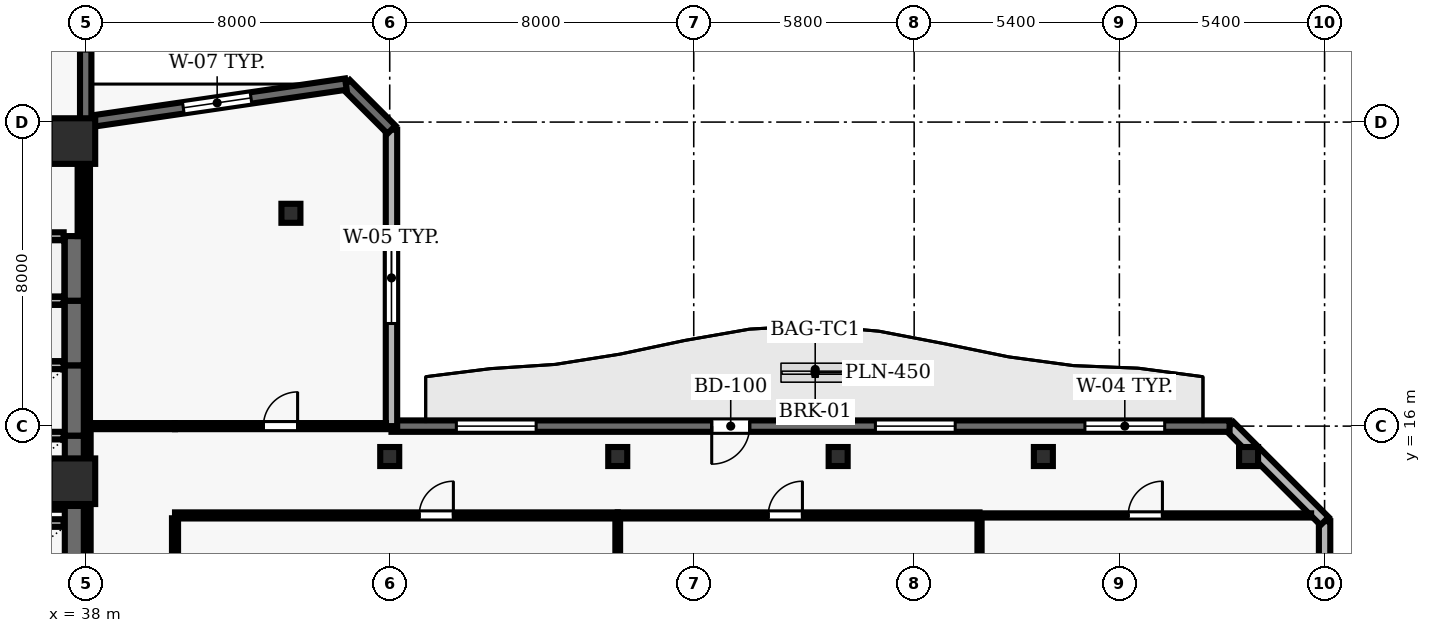
"""IFC4 building model, lengths in metres.
Left out: names, types, materials, properties, quantities, classifications, styles, units other than length and angle.
Written with IfcOpenShell. Run it as: python <this file> out.ifc"""

import sys

from ifc_helpers import new_model, si_unit, direction, frame, frame_2d, origin, origin_2d, place, context, subcontext, project, spatial, rectangle, hollow_rectangle, extrude, element, fill, save


model = new_model("IFC4")
c1 = context("Model", 3, precision=1e-05, world=origin(), true_north=direction((0.0, 1.0)))
c2 = subcontext(c1, "Body", "Model", "MODEL_VIEW")
j1 = project(units=[si_unit("LENGTHUNIT", "METRE"), si_unit("PLANEANGLEUNIT", "RADIAN")], contexts=[c1])
p1 = place(None, origin())
s1 = spatial("IfcSite", under=j1, at=p1, CompositionType="ELEMENT")
p2 = place(p1, origin())
s2 = spatial("IfcBuilding", under=s1, at=p2, CompositionType="ELEMENT")
p3 = place(p2, frame((0.0, 0.0, 146.3)))
s3 = spatial("IfcBuildingStorey", under=s2, at=p3, CompositionType="ELEMENT", Elevation=146.3)
for number, where, z_axis, x_axis in (
    (1, (37.65, 14.55, 0.0), (0.0, 0.0, 1.0), (1.0, 0.0, 0.0)),
    (2, (37.65, 23.5, 0.0), (0.0, 0.0, 1.0), (1.0, 0.0, 0.0)),
):
    element("IfcColumn", number, at=place(p3, frame(where, z_axis=z_axis, x_axis=x_axis)), inside=s3, PredefinedType="COLUMN", context=c2, shape_type="SweptSolid", body=[
        extrude(rectangle(XDim=1.2, YDim=1.2, at=origin_2d()), origin(), (0.0, 0.0, 1.0), 3.9),
    ])
for number, where, z_axis, x_axis in (
    (3, (46.0, 15.2, 0.0), (0.0, 0.0, 1.0), (1.0, 0.0, 0.0)),
    (4, (52.0, 15.2, 0.0), (0.0, 0.0, 1.0), (1.0, 0.0, 0.0)),
    (5, (57.8, 15.2, 0.0), (0.0, 0.0, 1.0), (1.0, 0.0, 0.0)),
    (6, (63.2, 15.2, 0.0), (0.0, 0.0, 1.0), (1.0, 0.0, 0.0)),
    (7, (68.6, 15.2, 0.0), (0.0, 0.0, 1.0), (1.0, 0.0, 0.0)),
    (8, (43.4, 21.6, 0.0), (0.0, 0.0, 1.0), (1.0, 0.0, 0.0)),
):
    element("IfcColumn", number, at=place(p3, frame(where, z_axis=z_axis, x_axis=x_axis)), inside=s3, PredefinedType="COLUMN", context=c2, shape_type="SweptSolid", body=[
        extrude(hollow_rectangle(XDim=0.5, YDim=0.5, WallThickness=0.025, at=origin_2d()), origin(), (0.0, 0.0, 1.0), 3.9),
    ])
p4 = place(p3, frame((70.6, 2.5, 0.0), z_axis=(0.0, 0.0, 1.0), x_axis=(0.0, 1.0, 0.0)))
e9 = element("IfcWall", 9, at=p4, inside=s3, PredefinedType="SOLIDWALL", context=c2, shape_type="SweptSolid", body=[
    extrude(rectangle(XDim=11.0, YDim=0.3, at=frame_2d((5.5, 0.0))), origin(), (0.0, 0.0, 1.0), 3.69),
])
p5 = place(p4, frame((2.0, 0.0, 0.9)))
e10 = element("IfcOpeningElement", 10, at=p5, cuts=e9, PredefinedType="OPENING", context=c2, shape_type="SweptSolid", body=[
    extrude(rectangle(XDim=1.5, YDim=1.6, at=frame_2d((0.75, 0.8))), frame((0.0, 0.16, 0.0), z_axis=(0.0, -1.0, 0.0), x_axis=(1.0, 0.0, 0.0)), (0.0, 0.0, 1.0), 0.32),
])
p6 = place(p4, frame((7.5, 0.0, 0.9)))
e11 = element("IfcOpeningElement", 11, at=p6, cuts=e9, PredefinedType="OPENING", context=c2, shape_type="SweptSolid", body=[
    extrude(rectangle(XDim=1.5, YDim=1.6, at=frame_2d((0.75, 0.8))), frame((0.0, 0.16, 0.0), z_axis=(0.0, -1.0, 0.0), x_axis=(1.0, 0.0, 0.0)), (0.0, 0.0, 1.0), 0.32),
])
p7 = place(p3, frame((70.6, 13.5, 0.0), z_axis=(0.0, 0.0, 1.0), x_axis=(-0.707106781187, 0.707106781187, 0.0)))
e12 = element("IfcWall", 12, at=p7, inside=s3, PredefinedType="SOLIDWALL", context=c2, shape_type="SweptSolid", body=[
    extrude(rectangle(XDim=3.536, YDim=0.3, at=frame_2d((1.768, 0.0))), origin(), (0.0, 0.0, 1.0), 3.69),
])
p8 = place(p3, frame((68.1, 16.0, 0.0), z_axis=(0.0, 0.0, 1.0), x_axis=(-1.0, 0.0, 0.0)))
e13 = element("IfcWall", 13, at=p8, inside=s3, PredefinedType="SOLIDWALL", context=c2, shape_type="SweptSolid", body=[
    extrude(rectangle(XDim=22.054, YDim=0.3, at=frame_2d((11.027, 0.0))), origin(), (0.0, 0.0, 1.0), 3.69),
])
p9 = place(p8, frame((12.627, 0.0, 0.0)))
e14 = element("IfcOpeningElement", 14, at=p9, cuts=e13, PredefinedType="OPENING", context=c2, shape_type="SweptSolid", body=[
    extrude(rectangle(XDim=1.0, YDim=2.2, at=frame_2d((0.5, 1.1))), frame((0.0, 0.16, 0.0), z_axis=(0.0, -1.0, 0.0), x_axis=(1.0, 0.0, 0.0)), (0.0, 0.0, 1.0), 0.32),
])
p10 = place(p8, frame((1.707, 0.0, 0.9)))
e15 = element("IfcOpeningElement", 15, at=p10, cuts=e13, PredefinedType="OPENING", context=c2, shape_type="SweptSolid", body=[
    extrude(rectangle(XDim=2.1, YDim=1.6, at=frame_2d((1.05, 0.8))), frame((0.0, 0.16, 0.0), z_axis=(0.0, -1.0, 0.0), x_axis=(1.0, 0.0, 0.0)), (0.0, 0.0, 1.0), 0.32),
])
p11 = place(p8, frame((7.22, 0.0, 0.9)))
e16 = element("IfcOpeningElement", 16, at=p11, cuts=e13, PredefinedType="OPENING", context=c2, shape_type="SweptSolid", body=[
    extrude(rectangle(XDim=2.1, YDim=1.6, at=frame_2d((1.05, 0.8))), frame((0.0, 0.16, 0.0), z_axis=(0.0, -1.0, 0.0), x_axis=(1.0, 0.0, 0.0)), (0.0, 0.0, 1.0), 0.32),
])
p12 = place(p8, frame((18.247, 0.0, 0.9)))
e17 = element("IfcOpeningElement", 17, at=p12, cuts=e13, PredefinedType="OPENING", context=c2, shape_type="SweptSolid", body=[
    extrude(rectangle(XDim=2.1, YDim=1.6, at=frame_2d((1.05, 0.8))), frame((0.0, 0.16, 0.0), z_axis=(0.0, -1.0, 0.0), x_axis=(1.0, 0.0, 0.0)), (0.0, 0.0, 1.0), 0.32),
])
p13 = place(p3, frame((46.046, 16.0, 0.0), z_axis=(0.0, 0.0, 1.0), x_axis=(0.0, 1.0, 0.0)))
e18 = element("IfcWall", 18, at=p13, inside=s3, PredefinedType="SOLIDWALL", context=c2, shape_type="SweptSolid", body=[
    extrude(rectangle(XDim=7.8, YDim=0.3, at=frame_2d((3.9, 0.0))), origin(), (0.0, 0.0, 1.0), 3.69),
])
p14 = place(p13, frame((2.7, 0.0, 0.9)))
e19 = element("IfcOpeningElement", 19, at=p14, cuts=e18, PredefinedType="OPENING", context=c2, shape_type="SweptSolid", body=[
    extrude(rectangle(XDim=2.4, YDim=1.6, at=frame_2d((1.2, 0.8))), frame((0.0, 0.16, 0.0), z_axis=(0.0, -1.0, 0.0), x_axis=(1.0, 0.0, 0.0)), (0.0, 0.0, 1.0), 0.32),
])
p15 = place(p3, frame((46.046, 23.8, 0.0), z_axis=(0.0, 0.0, 1.0), x_axis=(-0.707106781187, 0.707106781187, 0.0)))
e20 = element("IfcWall", 20, at=p15, inside=s3, PredefinedType="SOLIDWALL", context=c2, shape_type="SweptSolid", body=[
    extrude(rectangle(XDim=1.697, YDim=0.3, at=frame_2d((0.849, 0.0))), origin(), (0.0, 0.0, 1.0), 3.69),
])
p16 = place(p3, frame((44.846, 25.0, 0.0), z_axis=(0.0, 0.0, 1.0), x_axis=(-0.989499256162, -0.144537960602, 0.0)))
e21 = element("IfcWall", 21, at=p16, inside=s3, PredefinedType="SOLIDWALL", context=c2, shape_type="SweptSolid", body=[
    extrude(rectangle(XDim=6.919, YDim=0.3, at=frame_2d((3.459, 0.0))), origin(), (0.0, 0.0, 1.0), 3.69),
])
p17 = place(p16, frame((2.523, 0.0, 0.9)))
e22 = element("IfcOpeningElement", 22, at=p17, cuts=e21, PredefinedType="OPENING", context=c2, shape_type="SweptSolid", body=[
    extrude(rectangle(XDim=1.8, YDim=1.8, at=frame_2d((0.9, 0.9))), frame((0.0, 0.16, 0.0), z_axis=(0.0, -1.0, 0.0), x_axis=(1.0, 0.0, 0.0)), (0.0, 0.0, 1.0), 0.32),
])
p18 = place(p3, frame((38.0, 24.0, 0.0), z_axis=(0.0, 0.0, 1.0), x_axis=(0.0, 1.0, 0.0)))
e23 = element("IfcWall", 23, at=p18, inside=s3, PredefinedType="SOLIDWALL", context=c2, shape_type="SweptSolid", body=[
    extrude(rectangle(XDim=22.1, YDim=0.3, at=frame_2d((11.05, 0.0))), origin(), (0.0, 0.0, 1.0), 3.69),
])
p19 = place(p18, frame((12.35, 0.0, 0.0)))
e24 = element("IfcOpeningElement", 24, at=p19, cuts=e23, PredefinedType="OPENING", context=c2, shape_type="SweptSolid", body=[
    extrude(rectangle(XDim=1.0, YDim=2.2, at=frame_2d((0.5, 1.1))), frame((0.0, 0.16, 0.0), z_axis=(0.0, -1.0, 0.0), x_axis=(1.0, 0.0, 0.0)), (0.0, 0.0, 1.0), 0.32),
])
p20 = place(p18, frame((1.867, 0.0, 0.9)))
e25 = element("IfcOpeningElement", 25, at=p20, cuts=e23, PredefinedType="OPENING", context=c2, shape_type="SweptSolid", body=[
    extrude(rectangle(XDim=2.4, YDim=1.8, at=frame_2d((1.2, 0.9))), frame((0.0, 0.16, 0.0), z_axis=(0.0, -1.0, 0.0), x_axis=(1.0, 0.0, 0.0)), (0.0, 0.0, 1.0), 0.32),
])
p21 = place(p18, frame((16.833, 0.0, 0.9)))
e26 = element("IfcOpeningElement", 26, at=p21, cuts=e23, PredefinedType="OPENING", context=c2, shape_type="SweptSolid", body=[
    extrude(rectangle(XDim=2.4, YDim=1.8, at=frame_2d((1.2, 0.9))), frame((0.0, 0.16, 0.0), z_axis=(0.0, -1.0, 0.0), x_axis=(1.0, 0.0, 0.0)), (0.0, 0.0, 1.0), 0.32),
])
p22 = place(p3, frame((37.7, 11.55, 0.0), z_axis=(0.0, 0.0, 1.0), x_axis=(0.0, 1.0, 0.0)))
e27 = element("IfcWall", 27, at=p22, inside=s3, PredefinedType="SHEAR", context=c2, shape_type="SweptSolid", body=[
    extrude(rectangle(XDim=2.35, YDim=0.5, at=frame_2d((1.175, 0.0))), origin(), (0.0, 0.0, 1.0), 3.69),
])
p23 = place(p3, frame((37.42, 13.45, 0.0), z_axis=(0.0, 0.0, 1.0), x_axis=(-1.0, 0.0, 0.0)))
e28 = element("IfcWall", 28, at=p23, inside=s3, PredefinedType="SOLIDWALL", context=c2, shape_type="SweptSolid", body=[
    extrude(rectangle(XDim=2.14, YDim=0.2, at=frame_2d((1.07, 0.0))), origin(), (0.0, 0.0, 1.0), 3.69),
])
p24 = place(p3, frame((37.7, 13.9, 0.0), z_axis=(0.0, 0.0, 1.0), x_axis=(0.0, 1.0, 0.0)))
e29 = element("IfcWall", 29, at=p24, inside=s3, PredefinedType="SHEAR", context=c2, shape_type="SweptSolid", body=[
    extrude(rectangle(XDim=1.85, YDim=0.5, at=frame_2d((0.925, 0.0))), origin(), (0.0, 0.0, 1.0), 3.69),
])
for number, where, z_axis, x_axis in (
    (30, (35.28, 13.9, 0.0), (0.0, 0.0, 1.0), (1.0, 0.0, 0.0)),
    (31, (37.42, 15.75, 0.0), (0.0, 0.0, 1.0), (-1.0, 0.0, 0.0)),
):
    element("IfcWall", number, at=place(p3, frame(where, z_axis=z_axis, x_axis=x_axis)), inside=s3, PredefinedType="SOLIDWALL", context=c2, shape_type="SweptSolid", body=[
        extrude(rectangle(XDim=2.14, YDim=0.2, at=frame_2d((1.07, 0.0))), origin(), (0.0, 0.0, 1.0), 3.69),
    ])
p25 = place(p3, frame((37.7, 15.75, 0.0), z_axis=(0.0, 0.0, 1.0), x_axis=(0.0, 1.0, 0.0)))
e32 = element("IfcWall", 32, at=p25, inside=s3, PredefinedType="SHEAR", context=c2, shape_type="SweptSolid", body=[
    extrude(rectangle(XDim=1.85, YDim=0.5, at=frame_2d((0.925, 0.0))), origin(), (0.0, 0.0, 1.0), 3.69),
])
p26 = place(p3, frame((37.42, 17.6, 0.0), z_axis=(0.0, 0.0, 1.0), x_axis=(-1.0, 0.0, 0.0)))
e33 = element("IfcWall", 33, at=p26, inside=s3, PredefinedType="SOLIDWALL", context=c2, shape_type="SweptSolid", body=[
    extrude(rectangle(XDim=2.14, YDim=0.2, at=frame_2d((1.07, 0.0))), origin(), (0.0, 0.0, 1.0), 3.69),
])
p27 = place(p3, frame((37.7, 17.6, 0.0), z_axis=(0.0, 0.0, 1.0), x_axis=(0.0, 1.0, 0.0)))
e34 = element("IfcWall", 34, at=p27, inside=s3, PredefinedType="SHEAR", context=c2, shape_type="SweptSolid", body=[
    extrude(rectangle(XDim=1.7, YDim=0.5, at=frame_2d((0.85, 0.0))), origin(), (0.0, 0.0, 1.0), 3.69),
])
p28 = place(p3, frame((37.42, 19.3, 0.0), z_axis=(0.0, 0.0, 1.0), x_axis=(-1.0, 0.0, 0.0)))
e35 = element("IfcWall", 35, at=p28, inside=s3, PredefinedType="SOLIDWALL", context=c2, shape_type="SweptSolid", body=[
    extrude(rectangle(XDim=2.14, YDim=0.2, at=frame_2d((1.07, 0.0))), origin(), (0.0, 0.0, 1.0), 3.69),
])
p29 = place(p3, frame((37.7, 19.3, 0.0), z_axis=(0.0, 0.0, 1.0), x_axis=(0.0, 1.0, 0.0)))
e36 = element("IfcWall", 36, at=p29, inside=s3, PredefinedType="SHEAR", context=c2, shape_type="SweptSolid", body=[
    extrude(rectangle(XDim=1.7, YDim=0.5, at=frame_2d((0.85, 0.0))), origin(), (0.0, 0.0, 1.0), 3.69),
])
p30 = place(p3, frame((37.42, 21.0, 0.0), z_axis=(0.0, 0.0, 1.0), x_axis=(-1.0, 0.0, 0.0)))
e37 = element("IfcWall", 37, at=p30, inside=s3, PredefinedType="SOLIDWALL", context=c2, shape_type="SweptSolid", body=[
    extrude(rectangle(XDim=2.14, YDim=0.2, at=frame_2d((1.07, 0.0))), origin(), (0.0, 0.0, 1.0), 3.69),
])
p31 = place(p3, frame((37.85, 23.85, 0.0), z_axis=(0.0, 0.0, 1.0), x_axis=(-1.0, 0.0, 0.0)))
e38 = element("IfcWall", 38, at=p31, inside=s3, PredefinedType="PARTITIONING", context=c2, shape_type="SweptSolid", body=[
    extrude(rectangle(XDim=4.0, YDim=0.16, at=frame_2d((2.0, 0.0))), origin(), (0.0, 0.0, 1.0), 3.073),
])
p32 = place(p31, frame((2.25, 0.0, 0.0)))
e39 = element("IfcOpeningElement", 39, at=p32, cuts=e38, PredefinedType="OPENING", context=c2, shape_type="SweptSolid", body=[
    extrude(rectangle(XDim=0.9, YDim=2.1, at=frame_2d((0.45, 1.05))), frame((0.0, 0.09, 0.0), z_axis=(0.0, -1.0, 0.0), x_axis=(1.0, 0.0, 0.0)), (0.0, 0.0, 1.0), 0.18),
])
p33 = place(p3, frame((40.35, 13.65, 0.0), z_axis=(0.0, 0.0, 1.0), x_axis=(1.0, 0.0, 0.0)))
e40 = element("IfcWall", 40, at=p33, inside=s3, PredefinedType="PARTITIONING", context=c2, shape_type="SweptSolid", body=[
    extrude(rectangle(XDim=11.65, YDim=0.16, at=frame_2d((5.825, 0.0))), origin(), (0.0, 0.0, 1.0), 3.69),
])
p34 = place(p33, frame((6.425, 0.0, 0.0)))
e41 = element("IfcOpeningElement", 41, at=p34, cuts=e40, PredefinedType="OPENING", context=c2, shape_type="SweptSolid", body=[
    extrude(rectangle(XDim=0.9, YDim=2.1, at=frame_2d((0.45, 1.05))), frame((0.0, 0.09, 0.0), z_axis=(0.0, -1.0, 0.0), x_axis=(1.0, 0.0, 0.0)), (0.0, 0.0, 1.0), 0.18),
])
p35 = place(p3, frame((40.35, 16.0, 0.0), z_axis=(0.0, 0.0, 1.0), x_axis=(-1.0, 0.0, 0.0)))
e42 = element("IfcWall", 42, at=p35, inside=s3, PredefinedType="PARTITIONING", context=c2, shape_type="SweptSolid", body=[
    extrude(rectangle(XDim=2.3, YDim=0.16, at=frame_2d((1.15, 0.0))), origin(), (0.0, 0.0, 1.0), 3.69),
])
p36 = place(p3, frame((40.35, 16.0, 0.0), z_axis=(0.0, 0.0, 1.0), x_axis=(1.0, 0.0, 0.0)))
e43 = element("IfcWall", 43, at=p36, inside=s3, PredefinedType="PARTITIONING", context=c2, shape_type="SweptSolid", body=[
    extrude(rectangle(XDim=5.551, YDim=0.16, at=frame_2d((2.775, 0.0))), origin(), (0.0, 0.0, 1.0), 3.69),
])
p37 = place(p36, frame((2.326, 0.0, 0.0)))
e44 = element("IfcOpeningElement", 44, at=p37, cuts=e43, PredefinedType="OPENING", context=c2, shape_type="SweptSolid", body=[
    extrude(rectangle(XDim=0.9, YDim=2.1, at=frame_2d((0.45, 1.05))), frame((0.0, 0.09, 0.0), z_axis=(0.0, -1.0, 0.0), x_axis=(1.0, 0.0, 0.0)), (0.0, 0.0, 1.0), 0.18),
])
p38 = place(p3, frame((52.0, 13.65, 0.0), z_axis=(0.0, 0.0, 1.0), x_axis=(1.0, 0.0, 0.0)))
e45 = element("IfcWall", 45, at=p38, inside=s3, PredefinedType="PARTITIONING", context=c2, shape_type="SweptSolid", body=[
    extrude(rectangle(XDim=9.52, YDim=0.16, at=frame_2d((4.76, 0.0))), origin(), (0.0, 0.0, 1.0), 3.69),
])
p39 = place(p38, frame((3.96, 0.0, 0.0)))
e46 = element("IfcOpeningElement", 46, at=p39, cuts=e45, PredefinedType="OPENING", context=c2, shape_type="SweptSolid", body=[
    extrude(rectangle(XDim=0.9, YDim=2.1, at=frame_2d((0.45, 1.05))), frame((0.0, 0.09, 0.0), z_axis=(0.0, -1.0, 0.0), x_axis=(1.0, 0.0, 0.0)), (0.0, 0.0, 1.0), 0.18),
])
p40 = place(p3, frame((61.52, 13.65, 0.0), z_axis=(0.0, 0.0, 1.0), x_axis=(1.0, 0.0, 0.0)))
e47 = element("IfcWall", 47, at=p40, inside=s3, PredefinedType="MOVABLE", context=c2, shape_type="SweptSolid", body=[
    extrude(rectangle(XDim=8.725, YDim=0.11, at=frame_2d((4.363, 0.0))), origin(), (0.0, 0.0, 1.0), 3.69),
])
p41 = place(p40, frame((3.913, 0.0, 0.0)))
e48 = element("IfcOpeningElement", 48, at=p41, cuts=e47, PredefinedType="OPENING", context=c2, shape_type="SweptSolid", body=[
    extrude(rectangle(XDim=0.9, YDim=2.1, at=frame_2d((0.45, 1.05))), frame((0.0, 0.065, 0.0), z_axis=(0.0, -1.0, 0.0), x_axis=(1.0, 0.0, 0.0)), (0.0, 0.0, 1.0), 0.13),
])
p42 = place(p3, frame((37.85, 21.0, 0.0), z_axis=(0.0, 0.0, 1.0), x_axis=(0.0, 1.0, 0.0)))
e49 = element("IfcWall", 49, at=p42, inside=s3, PredefinedType="PARTITIONING", context=c2, shape_type="SweptSolid", body=[
    extrude(rectangle(XDim=2.775, YDim=0.125, at=frame_2d((1.387, 0.0))), origin(), (0.0, 0.0, 1.0), 3.073),
])
p43 = place(p3, frame((38.05, 15.925, 0.0), z_axis=(0.0, 0.0, 1.0), x_axis=(0.0, -1.0, 0.0)))
e50 = element("IfcWall", 50, at=p43, inside=s3, PredefinedType="PARTITIONING", context=c2, shape_type="SweptSolid", body=[
    extrude(rectangle(XDim=6.375, YDim=0.16, at=frame_2d((3.188, 0.0))), origin(), (0.0, 0.0, 1.0), 3.073),
])
p44 = place(p3, frame((38.05, 23.861, 0.0), z_axis=(0.0, 0.0, 1.0), x_axis=(0.0, -1.0, 0.0)))
e51 = element("IfcWall", 51, at=p44, inside=s3, PredefinedType="PARTITIONING", context=c2, shape_type="SweptSolid", body=[
    extrude(rectangle(XDim=7.786, YDim=0.125, at=frame_2d((3.893, 0.0))), origin(), (0.0, 0.0, 1.0), 3.073),
])
p45 = place(p3, frame((40.35, 8.008, 0.0), z_axis=(0.0, 0.0, 1.0), x_axis=(0.0, 1.0, 0.0)))
e52 = element("IfcWall", 52, at=p45, inside=s3, PredefinedType="PARTITIONING", context=c2, shape_type="SweptSolid", body=[
    extrude(rectangle(XDim=5.567, YDim=0.16, at=frame_2d((2.783, 0.0))), origin(), (0.0, 0.0, 1.0), 3.69),
])
p46 = place(p3, frame((52.0, 8.008, 0.0), z_axis=(0.0, 0.0, 1.0), x_axis=(0.0, 1.0, 0.0)))
e53 = element("IfcWall", 53, at=p46, inside=s3, PredefinedType="PARTITIONING", context=c2, shape_type="SweptSolid", body=[
    extrude(rectangle(XDim=5.567, YDim=0.125, at=frame_2d((2.783, 0.0))), origin(), (0.0, 0.0, 1.0), 3.073),
])
p47 = place(p3, frame((61.52, 8.008, 0.0), z_axis=(0.0, 0.0, 1.0), x_axis=(0.0, 1.0, 0.0)))
e54 = element("IfcWall", 54, at=p47, inside=s3, PredefinedType="MOVABLE", context=c2, shape_type="SweptSolid", body=[
    extrude(rectangle(XDim=5.567, YDim=0.11, at=frame_2d((2.783, 0.0))), origin(), (0.0, 0.0, 1.0), 3.69),
])
p48 = place(p9, origin())
e55 = element("IfcDoor", 55, at=p48, inside=s3, OperationType="SINGLE_SWING_RIGHT", PredefinedType="DOOR", context=c2, shape_type="SweptSolid", body=[
    extrude(rectangle(XDim=1.0, YDim=2.2, at=frame_2d((0.5, 1.1))), frame((0.0, 0.025, 0.0), z_axis=(0.0, -1.0, 0.0), x_axis=(1.0, 0.0, 0.0)), (0.0, 0.0, 1.0), 0.05),
])
fill(e14, e55)
p49 = place(p10, origin())
e56 = element("IfcWindow", 56, at=p49, inside=s3, PartitioningType="SINGLE_PANEL", PredefinedType="WINDOW", context=c2, shape_type="SweptSolid", body=[
    extrude(rectangle(XDim=2.1, YDim=1.6, at=frame_2d((1.05, 0.8))), frame((0.0, 0.03, 0.0), z_axis=(0.0, -1.0, 0.0), x_axis=(1.0, 0.0, 0.0)), (0.0, 0.0, 1.0), 0.06),
])
fill(e15, e56)
p50 = place(p11, origin())
e57 = element("IfcWindow", 57, at=p50, inside=s3, PartitioningType="SINGLE_PANEL", PredefinedType="WINDOW", context=c2, shape_type="SweptSolid", body=[
    extrude(rectangle(XDim=2.1, YDim=1.6, at=frame_2d((1.05, 0.8))), frame((0.0, 0.03, 0.0), z_axis=(0.0, -1.0, 0.0), x_axis=(1.0, 0.0, 0.0)), (0.0, 0.0, 1.0), 0.06),
])
fill(e16, e57)
p51 = place(p12, origin())
e58 = element("IfcWindow", 58, at=p51, inside=s3, PartitioningType="SINGLE_PANEL", PredefinedType="WINDOW", context=c2, shape_type="SweptSolid", body=[
    extrude(rectangle(XDim=2.1, YDim=1.6, at=frame_2d((1.05, 0.8))), frame((0.0, 0.03, 0.0), z_axis=(0.0, -1.0, 0.0), x_axis=(1.0, 0.0, 0.0)), (0.0, 0.0, 1.0), 0.06),
])
fill(e17, e58)
p52 = place(p14, origin())
e59 = element("IfcWindow", 59, at=p52, inside=s3, PartitioningType="SINGLE_PANEL", PredefinedType="WINDOW", context=c2, shape_type="SweptSolid", body=[
    extrude(rectangle(XDim=2.4, YDim=1.6, at=frame_2d((1.2, 0.8))), frame((0.0, 0.03, 0.0), z_axis=(0.0, -1.0, 0.0), x_axis=(1.0, 0.0, 0.0)), (0.0, 0.0, 1.0), 0.06),
])
fill(e19, e59)
p53 = place(p17, origin())
e60 = element("IfcWindow", 60, at=p53, inside=s3, PartitioningType="SINGLE_PANEL", PredefinedType="WINDOW", context=c2, shape_type="SweptSolid", body=[
    extrude(rectangle(XDim=1.8, YDim=1.8, at=frame_2d((0.9, 0.9))), frame((0.0, 0.03, 0.0), z_axis=(0.0, -1.0, 0.0), x_axis=(1.0, 0.0, 0.0)), (0.0, 0.0, 1.0), 0.06),
])
fill(e22, e60)
p54 = place(p34, origin())
e61 = element("IfcDoor", 61, at=p54, inside=s3, OperationType="SINGLE_SWING_RIGHT", PredefinedType="DOOR", context=c2, shape_type="SweptSolid", body=[
    extrude(rectangle(XDim=0.9, YDim=2.1, at=frame_2d((0.45, 1.05))), frame((0.0, 0.025, 0.0), z_axis=(0.0, -1.0, 0.0), x_axis=(1.0, 0.0, 0.0)), (0.0, 0.0, 1.0), 0.05),
])
fill(e41, e61)
p55 = place(p39, origin())
e62 = element("IfcDoor", 62, at=p55, inside=s3, OperationType="SINGLE_SWING_RIGHT", PredefinedType="DOOR", context=c2, shape_type="SweptSolid", body=[
    extrude(rectangle(XDim=0.9, YDim=2.1, at=frame_2d((0.45, 1.05))), frame((0.0, 0.025, 0.0), z_axis=(0.0, -1.0, 0.0), x_axis=(1.0, 0.0, 0.0)), (0.0, 0.0, 1.0), 0.05),
])
fill(e46, e62)
p56 = place(p41, origin())
e63 = element("IfcDoor", 63, at=p56, inside=s3, OperationType="SINGLE_SWING_RIGHT", PredefinedType="DOOR", context=c2, shape_type="SweptSolid", body=[
    extrude(rectangle(XDim=0.9, YDim=2.1, at=frame_2d((0.45, 1.05))), frame((0.0, 0.025, 0.0), z_axis=(0.0, -1.0, 0.0), x_axis=(1.0, 0.0, 0.0)), (0.0, 0.0, 1.0), 0.05),
])
fill(e48, e63)
p57 = place(p37, origin())
e64 = element("IfcDoor", 64, at=p57, inside=s3, OperationType="SINGLE_SWING_RIGHT", PredefinedType="DOOR", context=c2, shape_type="SweptSolid", body=[
    extrude(rectangle(XDim=0.9, YDim=2.1, at=frame_2d((0.45, 1.05))), frame((0.0, 0.025, 0.0), z_axis=(0.0, -1.0, 0.0), x_axis=(1.0, 0.0, 0.0)), (0.0, 0.0, 1.0), 0.05),
])
fill(e44, e64)
save(model, sys.argv[1])
